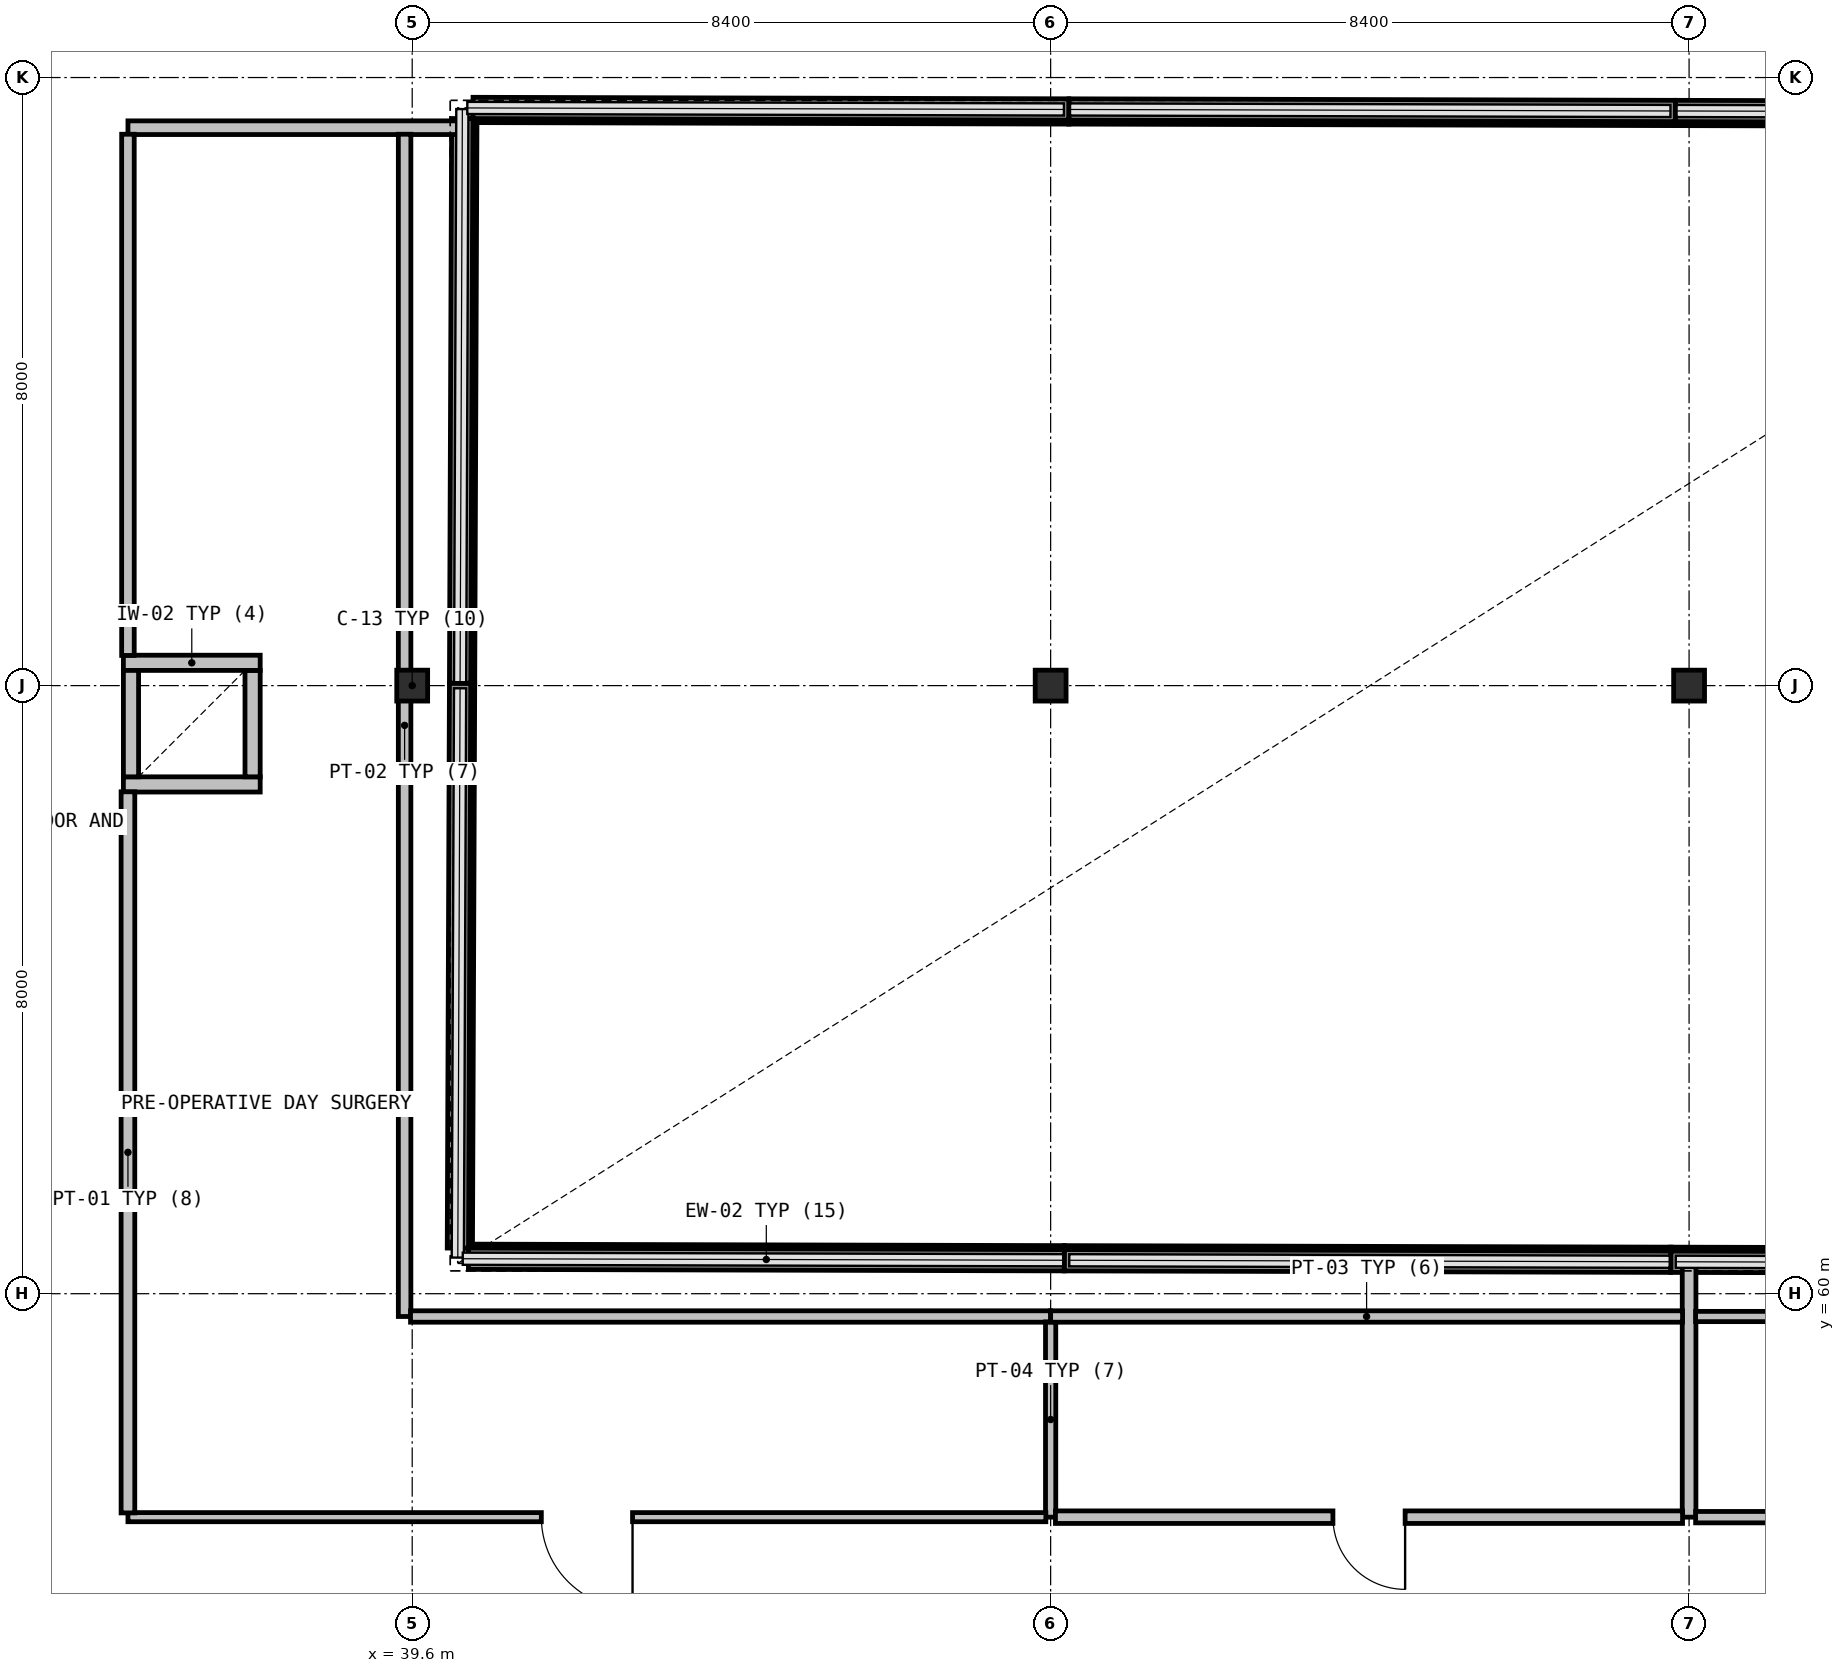
"""IFC4 building model, lengths in metres.
Left out: names, types, materials, properties, quantities, classifications, styles, units other than length and angle.
Written with IfcOpenShell. Run it as: python <this file> out.ifc"""

import sys

from ifc_helpers import new_model, si_unit, direction, frame, frame_2d, origin, origin_2d, place, context, subcontext, project, spatial, rectangle, hollow_circle, extrude, element, fill, save


model = new_model("IFC4")
c1 = context("Model", 3, precision=1e-05, world=origin(), true_north=direction((0.0, 1.0)))
c2 = subcontext(c1, "Body", "Model", "MODEL_VIEW")
j1 = project(units=[si_unit("LENGTHUNIT", "METRE"), si_unit("PLANEANGLEUNIT", "RADIAN")], contexts=[c1])
p1 = place(None, origin())
s1 = spatial("IfcSite", under=j1, at=p1, CompositionType="ELEMENT")
p2 = place(p1, origin())
s2 = spatial("IfcBuilding", under=s1, at=p2, CompositionType="ELEMENT")
p3 = place(p2, frame((0.0, 0.0, 5.4)))
s3 = spatial("IfcBuildingStorey", under=s2, at=p3, CompositionType="ELEMENT", Elevation=5.4)
for number, where, z_axis, x_axis in (
    (1, (39.6, 68.0, 0.0), (0.0, 0.0, 1.0), (1.0, 0.0, 0.0)),
    (2, (48.0, 68.0, 0.0), (0.0, 0.0, 1.0), (1.0, 0.0, 0.0)),
    (3, (56.4, 68.0, 0.0), (0.0, 0.0, 1.0), (1.0, 0.0, 0.0)),
):
    element("IfcColumn", number, at=place(p3, frame(where, z_axis=z_axis, x_axis=x_axis)), inside=s3, PredefinedType="COLUMN", context=c2, shape_type="SweptSolid", body=[
        extrude(hollow_circle(Radius=0.203, WallThickness=0.016, at=origin_2d()), origin(), (0.0, 0.0, 1.0), 4.8),
    ])
for number, where, z_axis, x_axis in (
    (4, (40.259, 75.46, 0.0), (0.0, 0.0, 1.0), (-0.004, -1.0, 0.0)),
    (5, (40.23, 68.028, 0.0), (0.0, 0.0, 1.0), (-0.004, -1.0, 0.0)),
):
    element("IfcWall", number, at=place(p3, frame(where, z_axis=z_axis, x_axis=x_axis)), inside=s3, PredefinedType="SOLIDWALL", context=c2, shape_type="SweptSolid", body=[
        extrude(rectangle(XDim=7.428, YDim=0.28, at=frame_2d((3.714, 0.0))), origin(), (0.0, 0.0, 1.0), 0.94),
    ])
p4 = place(p3, frame((40.34, 60.46, 0.0), z_axis=(0.0, 0.0, 1.0), x_axis=(0.99999673805, -0.002554190522, 0.0)))
e6 = element("IfcWall", 6, at=p4, inside=s3, PredefinedType="SOLIDWALL", context=c2, shape_type="SweptSolid", body=[
    extrude(rectangle(XDim=7.838, YDim=0.28, at=frame_2d((3.919, 0.0))), origin(), (0.0, 0.0, 1.0), 0.94),
])
p5 = place(p3, frame((48.182, 60.44, 0.0), z_axis=(0.0, 0.0, 1.0), x_axis=(0.999996850095, -0.002509940058, 0.0)))
e7 = element("IfcWall", 7, at=p5, inside=s3, PredefinedType="SOLIDWALL", context=c2, shape_type="SweptSolid", body=[
    extrude(rectangle(XDim=7.976, YDim=0.28, at=frame_2d((3.988, 0.0))), origin(), (0.0, 0.0, 1.0), 0.94),
])
p6 = place(p3, frame((56.162, 60.42, 0.0), z_axis=(0.0, 0.0, 1.0), x_axis=(0.99999673805, -0.002554190522, 0.0)))
e8 = element("IfcWall", 8, at=p6, inside=s3, PredefinedType="SOLIDWALL", context=c2, shape_type="SweptSolid", body=[
    extrude(rectangle(XDim=7.838, YDim=0.28, at=frame_2d((3.919, 0.0))), origin(), (0.0, 0.0, 1.0), 0.94),
])
p7 = place(p3, frame((64.06, 75.54, 0.0), z_axis=(0.0, 0.0, 1.0), x_axis=(-0.999996738253, 0.002554110965, 0.0)))
e9 = element("IfcWall", 9, at=p7, inside=s3, PredefinedType="SOLIDWALL", context=c2, shape_type="SweptSolid", body=[
    extrude(rectangle(XDim=7.838, YDim=0.28, at=frame_2d((3.919, 0.0))), origin(), (0.0, 0.0, 1.0), 0.94),
])
p8 = place(p3, frame((56.218, 75.56, 0.0), z_axis=(0.0, 0.0, 1.0), x_axis=(-0.999996850095, 0.002509940058, 0.0)))
e10 = element("IfcWall", 10, at=p8, inside=s3, PredefinedType="SOLIDWALL", context=c2, shape_type="SweptSolid", body=[
    extrude(rectangle(XDim=7.976, YDim=0.28, at=frame_2d((3.988, 0.0))), origin(), (0.0, 0.0, 1.0), 0.94),
])
p9 = place(p3, frame((48.238, 75.58, 0.0), z_axis=(0.0, 0.0, 1.0), x_axis=(-0.999996738253, 0.002554110965, 0.0)))
e11 = element("IfcWall", 11, at=p9, inside=s3, PredefinedType="SOLIDWALL", context=c2, shape_type="SweptSolid", body=[
    extrude(rectangle(XDim=7.838, YDim=0.28, at=frame_2d((3.919, 0.0))), origin(), (0.0, 0.0, 1.0), 0.94),
])
p10 = place(p3, frame((35.8, 66.7, 0.0), z_axis=(0.0, 0.0, 1.0), x_axis=(1.0, 0.0, 0.0)))
e12 = element("IfcWall", 12, at=p10, inside=s3, PredefinedType="SOLIDWALL", context=c2, shape_type="SweptSolid", body=[
    extrude(rectangle(XDim=1.8, YDim=0.2, at=frame_2d((0.9, 0.0))), origin(), (0.0, 0.0, 1.0), 4.445),
])
p11 = place(p3, frame((37.5, 66.8, 0.0), z_axis=(0.0, 0.0, 1.0), x_axis=(0.0, 1.0, 0.0)))
e13 = element("IfcWall", 13, at=p11, inside=s3, PredefinedType="SOLIDWALL", context=c2, shape_type="SweptSolid", body=[
    extrude(rectangle(XDim=1.4, YDim=0.2, at=frame_2d((0.7, 0.0))), origin(), (0.0, 0.0, 1.0), 4.445),
])
p12 = place(p3, frame((37.6, 68.3, 0.0), z_axis=(0.0, 0.0, 1.0), x_axis=(-1.0, 0.0, 0.0)))
e14 = element("IfcWall", 14, at=p12, inside=s3, PredefinedType="SOLIDWALL", context=c2, shape_type="SweptSolid", body=[
    extrude(rectangle(XDim=1.8, YDim=0.2, at=frame_2d((0.9, 0.0))), origin(), (0.0, 0.0, 1.0), 4.445),
])
p13 = place(p3, frame((35.9, 68.2, 0.0), z_axis=(0.0, 0.0, 1.0), x_axis=(0.0, -1.0, 0.0)))
e15 = element("IfcWall", 15, at=p13, inside=s3, PredefinedType="SOLIDWALL", context=c2, shape_type="SweptSolid", body=[
    extrude(rectangle(XDim=1.4, YDim=0.2, at=frame_2d((0.7, 0.0))), origin(), (0.0, 0.0, 1.0), 4.445),
])
p14 = place(p3, frame((35.86, 75.34, 0.0), z_axis=(0.0, 0.0, 1.0), x_axis=(1.0, 0.0, 0.0)))
e16 = element("IfcWall", 16, at=p14, inside=s3, PredefinedType="PARTITIONING", context=c2, shape_type="SweptSolid", body=[
    extrude(rectangle(XDim=4.357, YDim=0.18, at=frame_2d((2.178, 0.0))), origin(), (0.0, 0.0, 1.0), 4.445),
])
p15 = place(p3, frame((39.5, 75.254, 0.0), z_axis=(0.0, 0.0, 1.0), x_axis=(0.0, -1.0, 0.0)))
e17 = element("IfcWall", 17, at=p15, inside=s3, PredefinedType="PARTITIONING", context=c2, shape_type="SweptSolid", body=[
    extrude(rectangle(XDim=15.554, YDim=0.165, at=frame_2d((7.777, 0.0))), origin(), (0.0, 0.0, 1.0), 3.695),
])
p16 = place(p3, frame((39.578, 59.7, 0.0), z_axis=(0.0, 0.0, 1.0), x_axis=(1.0, 0.0, 0.0)))
e18 = element("IfcWall", 18, at=p16, inside=s3, PredefinedType="PARTITIONING", context=c2, shape_type="SweptSolid", body=[
    extrude(rectangle(XDim=8.422, YDim=0.15, at=frame_2d((4.211, 0.0))), origin(), (0.0, 0.0, 1.0), 4.445),
])
p17 = place(p3, frame((48.0, 59.629, 0.0), z_axis=(0.0, 0.0, 1.0), x_axis=(0.0, -1.0, 0.0)))
e19 = element("IfcWall", 19, at=p17, inside=s3, PredefinedType="PARTITIONING", context=c2, shape_type="SweptSolid", body=[
    extrude(rectangle(XDim=2.569, YDim=0.135, at=frame_2d((1.284, 0.0))), origin(), (0.0, 0.0, 1.0), 3.695),
])
p18 = place(p3, frame((47.937, 57.06, 0.0), z_axis=(0.0, 0.0, 1.0), x_axis=(-1.0, 0.0, 0.0)))
e20 = element("IfcWall", 20, at=p18, inside=s3, PredefinedType="PARTITIONING", context=c2, shape_type="SweptSolid", body=[
    extrude(rectangle(XDim=12.077, YDim=0.12, at=frame_2d((6.039, 0.0))), origin(), (0.0, 0.0, 1.0), 4.445),
])
p19 = place(p18, frame((5.438, 0.0, 0.0)))
e21 = element("IfcOpeningElement", 21, at=p19, cuts=e20, PredefinedType="OPENING", context=c2, shape_type="SweptSolid", body=[
    extrude(rectangle(XDim=1.2, YDim=2.15, at=frame_2d((0.6, 1.075))), frame((0.0, 0.07, 0.0), z_axis=(0.0, -1.0, 0.0), x_axis=(1.0, 0.0, 0.0)), (0.0, 0.0, 1.0), 0.14),
])
p20 = place(p3, frame((35.86, 57.116, 0.0), z_axis=(0.0, 0.0, 1.0), x_axis=(0.0, 1.0, 0.0)))
e22 = element("IfcWall", 22, at=p20, inside=s3, PredefinedType="PARTITIONING", context=c2, shape_type="SweptSolid", body=[
    extrude(rectangle(XDim=9.487, YDim=0.18, at=frame_2d((4.744, 0.0))), origin(), (0.0, 0.0, 1.0), 4.445),
])
p21 = place(p3, frame((35.86, 68.397, 0.0), z_axis=(0.0, 0.0, 1.0), x_axis=(0.0, 1.0, 0.0)))
e23 = element("IfcWall", 23, at=p21, inside=s3, PredefinedType="PARTITIONING", context=c2, shape_type="SweptSolid", body=[
    extrude(rectangle(XDim=6.857, YDim=0.165, at=frame_2d((3.428, 0.0))), origin(), (0.0, 0.0, 1.0), 4.445),
])
p22 = place(p3, frame((56.4, 60.377, 0.0), z_axis=(0.0, 0.0, 1.0), x_axis=(0.0, -1.0, 0.0)))
e24 = element("IfcWall", 24, at=p22, inside=s3, PredefinedType="PARTITIONING", context=c2, shape_type="SweptSolid", body=[
    extrude(rectangle(XDim=3.317, YDim=0.18, at=frame_2d((1.658, 0.0))), origin(), (0.0, 0.0, 1.0), 3.695),
])
p23 = place(p3, frame((56.314, 57.06, 0.0), z_axis=(0.0, 0.0, 1.0), x_axis=(-1.0, 0.0, 0.0)))
e25 = element("IfcWall", 25, at=p23, inside=s3, PredefinedType="PARTITIONING", context=c2, shape_type="SweptSolid", body=[
    extrude(rectangle(XDim=8.251, YDim=0.165, at=frame_2d((4.125, 0.0))), origin(), (0.0, 0.0, 1.0), 4.445),
])
p24 = place(p23, frame((3.65, 0.0, 0.0)))
e26 = element("IfcOpeningElement", 26, at=p24, cuts=e25, PredefinedType="OPENING", context=c2, shape_type="SweptSolid", body=[
    extrude(rectangle(XDim=0.95, YDim=2.1, at=frame_2d((0.475, 1.05))), frame((0.0, 0.093, 0.0), z_axis=(0.0, -1.0, 0.0), x_axis=(1.0, 0.0, 0.0)), (0.0, 0.0, 1.0), 0.185),
])
p25 = place(p3, frame((48.0, 59.7, 0.0), z_axis=(0.0, 0.0, 1.0), x_axis=(1.0, 0.0, 0.0)))
e27 = element("IfcWall", 27, at=p25, inside=s3, PredefinedType="PARTITIONING", context=c2, shape_type="SweptSolid", body=[
    extrude(rectangle(XDim=8.314, YDim=0.15, at=frame_2d((4.157, 0.0))), origin(), (0.0, 0.0, 1.0), 4.445),
])
p26 = place(p3, frame((64.721, 57.06, 0.0), z_axis=(0.0, 0.0, 1.0), x_axis=(-1.0, 0.0, 0.0)))
e28 = element("IfcWall", 28, at=p26, inside=s3, PredefinedType="PARTITIONING", context=c2, shape_type="SweptSolid", body=[
    extrude(rectangle(XDim=8.235, YDim=0.15, at=frame_2d((4.117, 0.0))), origin(), (0.0, 0.0, 1.0), 4.445),
])
p27 = place(p26, frame((3.468, 0.0, 0.0)))
e29 = element("IfcOpeningElement", 29, at=p27, cuts=e28, PredefinedType="OPENING", context=c2, shape_type="SweptSolid", body=[
    extrude(rectangle(XDim=1.3, YDim=2.15, at=frame_2d((0.65, 1.075))), frame((0.0, 0.085, 0.0), z_axis=(0.0, -1.0, 0.0), x_axis=(1.0, 0.0, 0.0)), (0.0, 0.0, 1.0), 0.17),
])
p28 = place(p3, frame((56.486, 59.7, 0.0), z_axis=(0.0, 0.0, 1.0), x_axis=(1.0, 0.0, 0.0)))
e30 = element("IfcWall", 30, at=p28, inside=s3, PredefinedType="PARTITIONING", context=c2, shape_type="SweptSolid", body=[
    extrude(rectangle(XDim=8.235, YDim=0.135, at=frame_2d((4.117, 0.0))), origin(), (0.0, 0.0, 1.0), 4.445),
])
p29 = place(p19, origin())
e31 = element("IfcDoor", 31, at=p29, inside=s3, OperationType="SINGLE_SWING_LEFT", PredefinedType="DOOR", context=c2, shape_type="SweptSolid", body=[
    extrude(rectangle(XDim=1.2, YDim=2.15, at=frame_2d((0.6, 1.075))), frame((0.0, 0.025, 0.0), z_axis=(0.0, -1.0, 0.0), x_axis=(1.0, 0.0, 0.0)), (0.0, 0.0, 1.0), 0.05),
])
fill(e21, e31)
p30 = place(p24, origin())
e32 = element("IfcDoor", 32, at=p30, inside=s3, OperationType="SINGLE_SWING_RIGHT", PredefinedType="DOOR", context=c2, shape_type="SweptSolid", body=[
    extrude(rectangle(XDim=0.95, YDim=2.1, at=frame_2d((0.475, 1.05))), frame((0.0, 0.025, 0.0), z_axis=(0.0, -1.0, 0.0), x_axis=(1.0, 0.0, 0.0)), (0.0, 0.0, 1.0), 0.05),
])
fill(e26, e32)
save(model, sys.argv[1])
